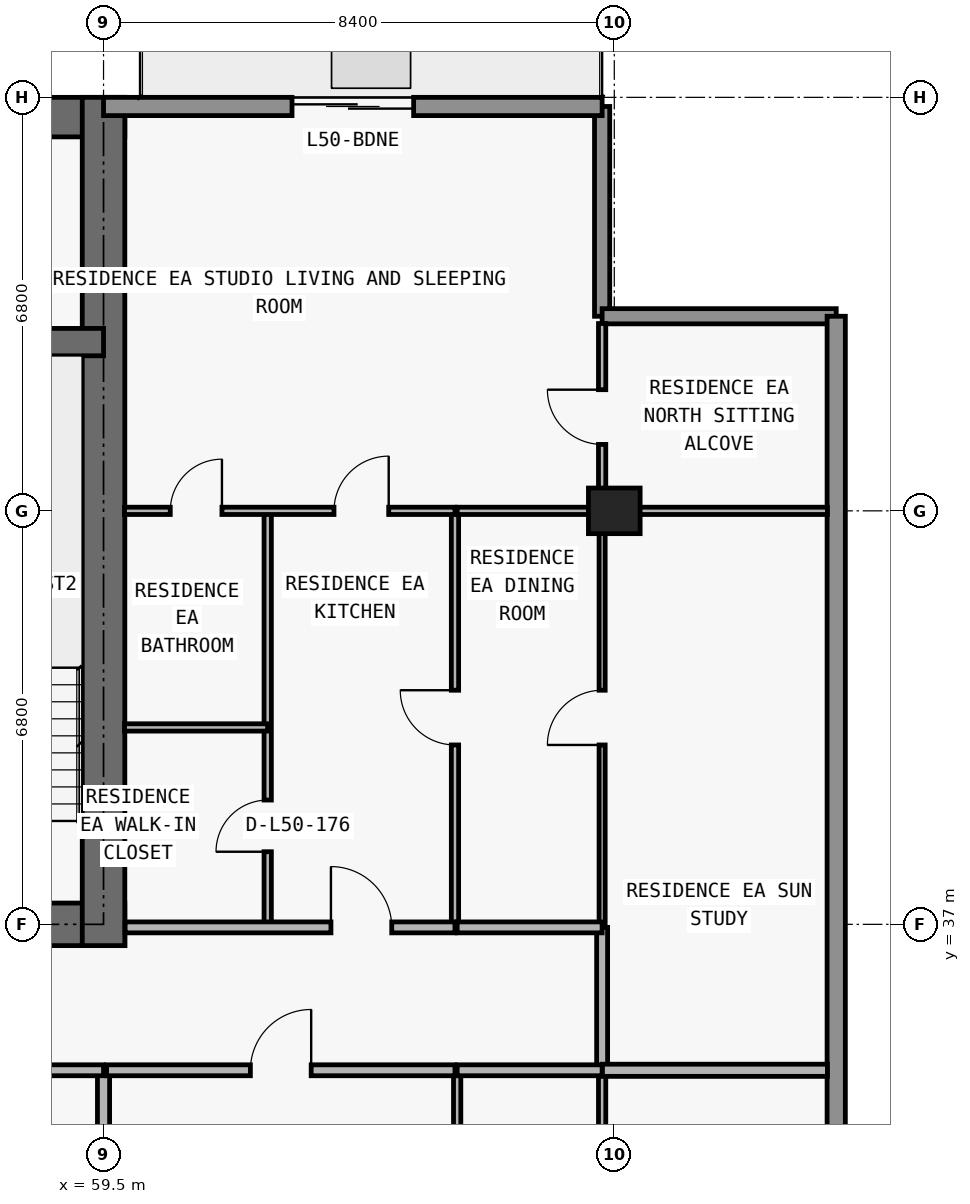
"""IFC4 building model, lengths in metres.
Left out: names, types, materials, properties, quantities, classifications, styles, units other than length and angle.
Written with IfcOpenShell. Run it as: python <this file> out.ifc"""

import sys

from ifc_helpers import new_model, si_unit, direction, frame, frame_2d, origin, origin_2d, place, context, subcontext, project, spatial, rectangle, extrude, element, fill, save


model = new_model("IFC4")
c1 = context("Model", 3, precision=1e-05, world=origin(), true_north=direction((0.0, 1.0)))
c2 = subcontext(c1, "Body", "Model", "MODEL_VIEW")
j1 = project(units=[si_unit("LENGTHUNIT", "METRE"), si_unit("PLANEANGLEUNIT", "RADIAN")], contexts=[c1])
p1 = place(None, origin())
s1 = spatial("IfcSite", under=j1, at=p1, CompositionType="ELEMENT")
p2 = place(p1, origin())
s2 = spatial("IfcBuilding", under=s1, at=p2, CompositionType="ELEMENT")
p3 = place(p2, frame((0.0, 0.0, 180.3)))
s3 = spatial("IfcBuildingStorey", under=s2, at=p3, CompositionType="ELEMENT", Elevation=180.3)
p4 = place(p3, frame((67.9, 43.8, 0.0), z_axis=(0.0, 0.0, 1.0), x_axis=(1.0, 0.0, 0.0)))
e1 = element("IfcColumn", 1, at=p4, inside=s3, PredefinedType="COLUMN", context=c2, shape_type="SweptSolid", body=[
    extrude(rectangle(XDim=0.85, YDim=0.75, at=origin_2d()), origin(), (0.0, 0.0, 1.0), 3.0),
])
p5 = place(p3, frame((17.95, 37.0, 0.0), z_axis=(0.0, 0.0, 1.0), x_axis=(1.0, 0.0, 0.0)))
e2 = element("IfcWall", 2, at=p5, inside=s3, PredefinedType="SHEAR", context=c2, shape_type="SweptSolid", body=[
    extrude(rectangle(XDim=41.9, YDim=0.7, at=frame_2d((20.95, 0.0))), origin(), (0.0, 0.0, 1.0), 3.0),
])
p6 = place(p5, frame((14.35, 0.0, 0.0)))
e3 = element("IfcOpeningElement", 3, at=p6, cuts=e2, PredefinedType="OPENING", context=c2, shape_type="SweptSolid", body=[
    extrude(rectangle(XDim=1.1, YDim=2.15, at=frame_2d((0.55, 1.075))), frame((0.0, 0.36, 0.0), z_axis=(0.0, -1.0, 0.0), x_axis=(1.0, 0.0, 0.0)), (0.0, 0.0, 1.0), 0.72),
])
p7 = place(p5, frame((6.2, 0.0, 0.0)))
e4 = element("IfcOpeningElement", 4, at=p7, cuts=e2, PredefinedType="OPENING", context=c2, shape_type="SweptSolid", body=[
    extrude(rectangle(XDim=1.05, YDim=2.15, at=frame_2d((0.525, 1.075))), frame((0.0, 0.36, 0.0), z_axis=(0.0, -1.0, 0.0), x_axis=(1.0, 0.0, 0.0)), (0.0, 0.0, 1.0), 0.72),
])
p8 = place(p5, frame((34.7, 0.0, 0.0)))
e5 = element("IfcOpeningElement", 5, at=p8, cuts=e2, PredefinedType="OPENING", context=c2, shape_type="SweptSolid", body=[
    extrude(rectangle(XDim=1.05, YDim=2.15, at=frame_2d((0.525, 1.075))), frame((0.0, 0.36, 0.0), z_axis=(0.0, -1.0, 0.0), x_axis=(1.0, 0.0, 0.0)), (0.0, 0.0, 1.0), 0.72),
])
p9 = place(p5, frame((10.812, 0.0, 0.0)))
e6 = element("IfcOpeningElement", 6, at=p9, cuts=e2, PredefinedType="OPENING", context=c2, shape_type="SweptSolid", body=[
    extrude(rectangle(XDim=1.05, YDim=2.15, at=frame_2d((0.525, 1.075))), frame((0.0, 0.36, 0.0), z_axis=(0.0, -1.0, 0.0), x_axis=(1.0, 0.0, 0.0)), (0.0, 0.0, 1.0), 0.72),
])
p10 = place(p5, frame((24.05, 0.0, 0.0)))
e7 = element("IfcOpeningElement", 7, at=p10, cuts=e2, PredefinedType="OPENING", context=c2, shape_type="SweptSolid", body=[
    extrude(rectangle(XDim=1.05, YDim=2.15, at=frame_2d((0.525, 1.075))), frame((0.0, 0.36, 0.0), z_axis=(0.0, -1.0, 0.0), x_axis=(1.0, 0.0, 0.0)), (0.0, 0.0, 1.0), 0.72),
])
p11 = place(p3, frame((17.95, 50.275, 0.0), z_axis=(0.0, 0.0, 1.0), x_axis=(1.0, 0.0, 0.0)))
e8 = element("IfcWall", 8, at=p11, inside=s3, PredefinedType="SHEAR", context=c2, shape_type="SweptSolid", body=[
    extrude(rectangle(XDim=41.9, YDim=0.65, at=frame_2d((20.95, 0.0))), origin(), (0.0, 0.0, 1.0), 3.0),
])
p12 = place(p3, frame((59.5, 36.65, 0.0), z_axis=(0.0, 0.0, 1.0), x_axis=(0.0, 1.0, 0.0)))
e9 = element("IfcWall", 9, at=p12, inside=s3, PredefinedType="SHEAR", context=c2, shape_type="SweptSolid", body=[
    extrude(rectangle(XDim=13.95, YDim=0.7, at=frame_2d((6.975, 0.0))), origin(), (0.0, 0.0, 1.0), 3.0),
])
p13 = place(p3, frame((18.3, 46.575, 0.0), z_axis=(0.0, 0.0, 1.0), x_axis=(1.0, 0.0, 0.0)))
e10 = element("IfcWall", 10, at=p13, inside=s3, PredefinedType="SHEAR", context=c2, shape_type="SweptSolid", body=[
    extrude(rectangle(XDim=41.2, YDim=0.45, at=frame_2d((20.6, 0.0))), origin(), (0.0, 0.0, 1.0), 3.0),
])
p14 = place(p13, frame((7.6, 0.0, 0.0)))
e11 = element("IfcOpeningElement", 11, at=p14, cuts=e10, PredefinedType="OPENING", context=c2, shape_type="SweptSolid", body=[
    extrude(rectangle(XDim=1.0, YDim=2.2, at=frame_2d((0.5, 1.1))), frame((0.0, 0.235, 0.0), z_axis=(0.0, -1.0, 0.0), x_axis=(1.0, 0.0, 0.0)), (0.0, 0.0, 1.0), 0.47),
])
p15 = place(p13, frame((32.625, 0.0, 0.0)))
e12 = element("IfcOpeningElement", 12, at=p15, cuts=e10, PredefinedType="OPENING", context=c2, shape_type="SweptSolid", body=[
    extrude(rectangle(XDim=1.05, YDim=2.15, at=frame_2d((0.525, 1.075))), frame((0.0, 0.235, 0.0), z_axis=(0.0, -1.0, 0.0), x_axis=(1.0, 0.0, 0.0)), (0.0, 0.0, 1.0), 0.47),
])
p16 = place(p3, frame((67.7, 50.45, 0.0), z_axis=(0.0, 0.0, 1.0), x_axis=(0.0, -1.0, 0.0)))
e13 = element("IfcWall", 13, at=p16, inside=s3, PredefinedType="ELEMENTEDWALL", context=c2, shape_type="SweptSolid", body=[
    extrude(rectangle(XDim=3.45, YDim=0.25, at=frame_2d((1.725, 0.0))), origin(), (0.0, 0.0, 1.0), 3.0),
])
p17 = place(p3, frame((67.7, 47.0, 0.0), z_axis=(0.0, 0.0, 1.0), x_axis=(1.0, 0.0, 0.0)))
e14 = element("IfcWall", 14, at=p17, inside=s3, PredefinedType="ELEMENTEDWALL", context=c2, shape_type="SweptSolid", body=[
    extrude(rectangle(XDim=3.85, YDim=0.25, at=frame_2d((1.925, 0.0))), origin(), (0.0, 0.0, 1.0), 3.0),
])
p18 = place(p3, frame((71.55, 47.0, 0.0), z_axis=(0.0, 0.0, 1.0), x_axis=(0.0, -1.0, 0.0)))
e15 = element("IfcWall", 15, at=p18, inside=s3, PredefinedType="STANDARD", context=c2, shape_type="SweptSolid", body=[
    extrude(rectangle(XDim=17.9, YDim=0.3, at=frame_2d((8.95, 0.0))), origin(), (0.0, 0.0, 1.0), 3.0),
])
p19 = place(p3, frame((59.5, 50.45, 0.0), z_axis=(0.0, 0.0, 1.0), x_axis=(1.0, 0.0, 0.0)))
e16 = element("IfcWall", 16, at=p19, inside=s3, PredefinedType="STANDARD", context=c2, shape_type="SweptSolid", body=[
    extrude(rectangle(XDim=8.2, YDim=0.3, at=frame_2d((4.1, 0.0))), origin(), (0.0, 0.0, 1.0), 3.0),
])
p20 = place(p19, frame((3.1, 0.0, 0.0)))
e17 = element("IfcOpeningElement", 17, at=p20, cuts=e16, PredefinedType="OPENING", context=c2, shape_type="SweptSolid", body=[
    extrude(rectangle(XDim=2.0, YDim=2.3, at=frame_2d((1.0, 1.15))), frame((0.0, 0.16, 0.0), z_axis=(0.0, -1.0, 0.0), x_axis=(1.0, 0.0, 0.0)), (0.0, 0.0, 1.0), 0.32),
])
p21 = place(p3, frame((59.5, 30.34, 0.0), z_axis=(0.0, 0.0, 1.0), x_axis=(0.0, 1.0, 0.0)))
e18 = element("IfcWall", 18, at=p21, inside=s3, PredefinedType="PARTITIONING", context=c2, shape_type="SweptSolid", body=[
    extrude(rectangle(XDim=4.26, YDim=0.2, at=frame_2d((2.13, 0.0))), origin(), (0.0, 0.0, 1.0), 2.213),
])
p22 = place(p3, frame((62.2, 37.0, 0.0), z_axis=(0.0, 0.0, 1.0), x_axis=(0.0, 1.0, 0.0)))
e19 = element("IfcWall", 19, at=p22, inside=s3, PredefinedType="PARTITIONING", context=c2, shape_type="SweptSolid", body=[
    extrude(rectangle(XDim=6.8, YDim=0.12, at=frame_2d((3.4, 0.0))), origin(), (0.0, 0.0, 1.0), 3.0),
])
p23 = place(p22, frame((1.194, 0.0, 0.0)))
e20 = element("IfcOpeningElement", 20, at=p23, cuts=e19, PredefinedType="OPENING", context=c2, shape_type="SweptSolid", body=[
    extrude(rectangle(XDim=0.85, YDim=2.1, at=frame_2d((0.425, 1.05))), frame((0.0, 0.07, 0.0), z_axis=(0.0, -1.0, 0.0), x_axis=(1.0, 0.0, 0.0)), (0.0, 0.0, 1.0), 0.14),
])
p24 = place(p3, frame((65.28, 37.0, 0.0), z_axis=(0.0, 0.0, 1.0), x_axis=(0.0, 1.0, 0.0)))
e21 = element("IfcWall", 21, at=p24, inside=s3, PredefinedType="PARTITIONING", context=c2, shape_type="SweptSolid", body=[
    extrude(rectangle(XDim=6.8, YDim=0.12, at=frame_2d((3.4, 0.0))), origin(), (0.0, 0.0, 1.0), 3.0),
])
p25 = place(p24, frame((2.95, 0.0, 0.0)))
e22 = element("IfcOpeningElement", 22, at=p25, cuts=e21, PredefinedType="OPENING", context=c2, shape_type="SweptSolid", body=[
    extrude(rectangle(XDim=0.9, YDim=2.15, at=frame_2d((0.45, 1.075))), frame((0.0, 0.07, 0.0), z_axis=(0.0, -1.0, 0.0), x_axis=(1.0, 0.0, 0.0)), (0.0, 0.0, 1.0), 0.14),
])
p26 = place(p3, frame((65.316, 30.34, 0.0), z_axis=(0.0, 0.0, 1.0), x_axis=(0.0, 1.0, 0.0)))
e23 = element("IfcWall", 23, at=p26, inside=s3, PredefinedType="PARTITIONING", context=c2, shape_type="SweptSolid", body=[
    extrude(rectangle(XDim=4.26, YDim=0.12, at=frame_2d((2.13, 0.0))), origin(), (0.0, 0.0, 1.0), 3.0),
])
p27 = place(p26, frame((1.705, 0.0, 0.0)))
e24 = element("IfcOpeningElement", 24, at=p27, cuts=e23, PredefinedType="OPENING", context=c2, shape_type="SweptSolid", body=[
    extrude(rectangle(XDim=0.85, YDim=2.1, at=frame_2d((0.425, 1.05))), frame((0.0, 0.07, 0.0), z_axis=(0.0, -1.0, 0.0), x_axis=(1.0, 0.0, 0.0)), (0.0, 0.0, 1.0), 0.14),
])
p28 = place(p3, frame((67.7, 30.34, 0.0), z_axis=(0.0, 0.0, 1.0), x_axis=(0.0, 1.0, 0.0)))
e25 = element("IfcWall", 25, at=p28, inside=s3, PredefinedType="PARTITIONING", context=c2, shape_type="SweptSolid", body=[
    extrude(rectangle(XDim=4.26, YDim=0.12, at=frame_2d((2.13, 0.0))), origin(), (0.0, 0.0, 1.0), 2.213),
])
p29 = place(p3, frame((67.7, 34.605, 0.0), z_axis=(0.0, 0.0, 1.0), x_axis=(0.0, 1.0, 0.0)))
e26 = element("IfcWall", 26, at=p29, inside=s3, PredefinedType="PARTITIONING", context=c2, shape_type="SweptSolid", body=[
    extrude(rectangle(XDim=2.345, YDim=0.18, at=frame_2d((1.172, 0.0))), origin(), (0.0, 0.0, 1.0), 2.213),
])
p30 = place(p3, frame((67.7, 37.0, 0.0), z_axis=(0.0, 0.0, 1.0), x_axis=(0.0, 1.0, 0.0)))
e27 = element("IfcWall", 27, at=p30, inside=s3, PredefinedType="MOVABLE", context=c2, shape_type="SweptSolid", body=[
    extrude(rectangle(XDim=6.8, YDim=0.1, at=frame_2d((3.4, 0.0))), origin(), (0.0, 0.0, 1.0), 2.213),
])
p31 = place(p30, frame((2.95, 0.0, 0.0)))
e28 = element("IfcOpeningElement", 28, at=p31, cuts=e27, PredefinedType="OPENING", context=c2, shape_type="SweptSolid", body=[
    extrude(rectangle(XDim=0.9, YDim=2.15, at=frame_2d((0.45, 1.075))), frame((0.0, 0.06, 0.0), z_axis=(0.0, -1.0, 0.0), x_axis=(1.0, 0.0, 0.0)), (0.0, 0.0, 1.0), 0.12),
])
p32 = place(p3, frame((67.7, 43.805, 0.0), z_axis=(0.0, 0.0, 1.0), x_axis=(0.0, 1.0, 0.0)))
e29 = element("IfcWall", 29, at=p32, inside=s3, PredefinedType="PARTITIONING", context=c2, shape_type="SweptSolid", body=[
    extrude(rectangle(XDim=3.075, YDim=0.12, at=frame_2d((1.538, 0.0))), origin(), (0.0, 0.0, 1.0), 3.0),
])
p33 = place(p32, frame((1.087, 0.0, 0.0)))
e30 = element("IfcOpeningElement", 30, at=p33, cuts=e29, PredefinedType="OPENING", context=c2, shape_type="SweptSolid", body=[
    extrude(rectangle(XDim=0.9, YDim=2.15, at=frame_2d((0.45, 1.075))), frame((0.0, 0.07, 0.0), z_axis=(0.0, -1.0, 0.0), x_axis=(1.0, 0.0, 0.0)), (0.0, 0.0, 1.0), 0.14),
])
p34 = place(p3, frame((18.3, 34.6, 0.0), z_axis=(0.0, 0.0, 1.0), x_axis=(1.0, 0.0, 0.0)))
e31 = element("IfcWall", 31, at=p34, inside=s3, PredefinedType="PARTITIONING", context=c2, shape_type="SweptSolid", body=[
    extrude(rectangle(XDim=41.2, YDim=0.18, at=frame_2d((20.6, 0.0))), origin(), (0.0, 0.0, 1.0), 3.0),
])
p35 = place(p34, frame((2.67, 0.0, 0.0)))
e32 = element("IfcOpeningElement", 32, at=p35, cuts=e31, PredefinedType="OPENING", context=c2, shape_type="SweptSolid", body=[
    extrude(rectangle(XDim=1.0, YDim=2.2, at=frame_2d((0.5, 1.1))), frame((0.0, 0.1, 0.0), z_axis=(0.0, -1.0, 0.0), x_axis=(1.0, 0.0, 0.0)), (0.0, 0.0, 1.0), 0.2),
])
p36 = place(p34, frame((11.212, 0.0, 0.0)))
e33 = element("IfcOpeningElement", 33, at=p36, cuts=e31, PredefinedType="OPENING", context=c2, shape_type="SweptSolid", body=[
    extrude(rectangle(XDim=1.0, YDim=2.2, at=frame_2d((0.5, 1.1))), frame((0.0, 0.1, 0.0), z_axis=(0.0, -1.0, 0.0), x_axis=(1.0, 0.0, 0.0)), (0.0, 0.0, 1.0), 0.2),
])
p37 = place(p34, frame((35.483, 0.0, 0.0)))
e34 = element("IfcOpeningElement", 34, at=p37, cuts=e31, PredefinedType="OPENING", context=c2, shape_type="SweptSolid", body=[
    extrude(rectangle(XDim=1.0, YDim=2.2, at=frame_2d((0.5, 1.1))), frame((0.0, 0.1, 0.0), z_axis=(0.0, -1.0, 0.0), x_axis=(1.0, 0.0, 0.0)), (0.0, 0.0, 1.0), 0.2),
])
p38 = place(p3, frame((59.55, 34.6, 0.0), z_axis=(0.0, 0.0, 1.0), x_axis=(1.0, 0.0, 0.0)))
e35 = element("IfcWall", 35, at=p38, inside=s3, PredefinedType="PARTITIONING", context=c2, shape_type="SweptSolid", body=[
    extrude(rectangle(XDim=5.73, YDim=0.18, at=frame_2d((2.865, 0.0))), origin(), (0.0, 0.0, 1.0), 3.0),
])
p39 = place(p38, frame((2.365, 0.0, 0.0)))
e36 = element("IfcOpeningElement", 36, at=p39, cuts=e35, PredefinedType="OPENING", context=c2, shape_type="SweptSolid", body=[
    extrude(rectangle(XDim=1.0, YDim=2.2, at=frame_2d((0.5, 1.1))), frame((0.0, 0.1, 0.0), z_axis=(0.0, -1.0, 0.0), x_axis=(1.0, 0.0, 0.0)), (0.0, 0.0, 1.0), 0.2),
])
p40 = place(p3, frame((65.316, 34.6, 0.0), z_axis=(0.0, 0.0, 1.0), x_axis=(1.0, 0.0, 0.0)))
e37 = element("IfcWall", 37, at=p40, inside=s3, PredefinedType="PARTITIONING", context=c2, shape_type="SweptSolid", body=[
    extrude(rectangle(XDim=2.384, YDim=0.18, at=frame_2d((1.192, 0.0))), origin(), (0.0, 0.0, 1.0), 3.0),
])
p41 = place(p3, frame((67.705, 34.6, 0.0), z_axis=(0.0, 0.0, 1.0), x_axis=(1.0, 0.0, 0.0)))
e38 = element("IfcWall", 38, at=p41, inside=s3, PredefinedType="PARTITIONING", context=c2, shape_type="SweptSolid", body=[
    extrude(rectangle(XDim=3.7, YDim=0.2, at=frame_2d((1.85, 0.0))), origin(), (0.0, 0.0, 1.0), 3.0),
])
p42 = place(p3, frame((59.855, 36.95, 0.0), z_axis=(0.0, 0.0, 1.0), x_axis=(1.0, 0.0, 0.0)))
e39 = element("IfcWall", 39, at=p42, inside=s3, PredefinedType="PARTITIONING", context=c2, shape_type="SweptSolid", body=[
    extrude(rectangle(XDim=5.425, YDim=0.18, at=frame_2d((2.712, 0.0))), origin(), (0.0, 0.0, 1.0), 3.0),
])
p43 = place(p42, frame((3.385, 0.0, 0.0)))
e40 = element("IfcOpeningElement", 40, at=p43, cuts=e39, PredefinedType="OPENING", context=c2, shape_type="SweptSolid", body=[
    extrude(rectangle(XDim=1.0, YDim=2.2, at=frame_2d((0.5, 1.1))), frame((0.0, 0.1, 0.0), z_axis=(0.0, -1.0, 0.0), x_axis=(1.0, 0.0, 0.0)), (0.0, 0.0, 1.0), 0.2),
])
p44 = place(p3, frame((65.316, 36.95, 0.0), z_axis=(0.0, 0.0, 1.0), x_axis=(1.0, 0.0, 0.0)))
e41 = element("IfcWall", 41, at=p44, inside=s3, PredefinedType="PARTITIONING", context=c2, shape_type="SweptSolid", body=[
    extrude(rectangle(XDim=2.384, YDim=0.18, at=frame_2d((1.192, 0.0))), origin(), (0.0, 0.0, 1.0), 3.0),
])
p45 = place(p3, frame((59.845, 40.238, 0.0), z_axis=(0.0, 0.0, 1.0), x_axis=(1.0, 0.0, 0.0)))
e42 = element("IfcWall", 42, at=p45, inside=s3, PredefinedType="PARTITIONING", context=c2, shape_type="SweptSolid", body=[
    extrude(rectangle(XDim=2.355, YDim=0.12, at=frame_2d((1.177, 0.0))), origin(), (0.0, 0.0, 1.0), 3.0),
])
p46 = place(p3, frame((59.845, 43.8, 0.0), z_axis=(0.0, 0.0, 1.0), x_axis=(1.0, 0.0, 0.0)))
e43 = element("IfcWall", 43, at=p46, inside=s3, PredefinedType="PARTITIONING", context=c2, shape_type="SweptSolid", body=[
    extrude(rectangle(XDim=5.435, YDim=0.12, at=frame_2d((2.718, 0.0))), origin(), (0.0, 0.0, 1.0), 2.368),
])
p47 = place(p46, frame((3.445, 0.0, 0.0)))
e44 = element("IfcOpeningElement", 44, at=p47, cuts=e43, PredefinedType="OPENING", context=c2, shape_type="SweptSolid", body=[
    extrude(rectangle(XDim=0.9, YDim=2.15, at=frame_2d((0.45, 1.075))), frame((0.0, 0.07, 0.0), z_axis=(0.0, -1.0, 0.0), x_axis=(1.0, 0.0, 0.0)), (0.0, 0.0, 1.0), 0.14),
])
p48 = place(p46, frame((0.752, 0.0, 0.0)))
e45 = element("IfcOpeningElement", 45, at=p48, cuts=e43, PredefinedType="OPENING", context=c2, shape_type="SweptSolid", body=[
    extrude(rectangle(XDim=0.85, YDim=2.1, at=frame_2d((0.425, 1.05))), frame((0.0, 0.07, 0.0), z_axis=(0.0, -1.0, 0.0), x_axis=(1.0, 0.0, 0.0)), (0.0, 0.0, 1.0), 0.14),
])
p49 = place(p3, frame((65.316, 43.8, 0.0), z_axis=(0.0, 0.0, 1.0), x_axis=(1.0, 0.0, 0.0)))
e46 = element("IfcWall", 46, at=p49, inside=s3, PredefinedType="PARTITIONING", context=c2, shape_type="SweptSolid", body=[
    extrude(rectangle(XDim=6.089, YDim=0.12, at=frame_2d((3.044, 0.0))), origin(), (0.0, 0.0, 1.0), 2.368),
])
p50 = place(p20, origin())
e47 = element("IfcDoor", 47, at=p50, inside=s3, OperationType="DOUBLE_DOOR_SLIDING", PredefinedType="DOOR", context=c2, shape_type="SweptSolid", body=[
    extrude(rectangle(XDim=2.0, YDim=2.3, at=frame_2d((1.0, 1.15))), frame((0.0, 0.025, 0.0), z_axis=(0.0, -1.0, 0.0), x_axis=(1.0, 0.0, 0.0)), (0.0, 0.0, 1.0), 0.05),
])
fill(e17, e47)
p51 = place(p39, origin())
e48 = element("IfcDoor", 48, at=p51, inside=s3, OperationType="SINGLE_SWING_RIGHT", PredefinedType="DOOR", context=c2, shape_type="SweptSolid", body=[
    extrude(rectangle(XDim=1.0, YDim=2.2, at=frame_2d((0.5, 1.1))), frame((0.0, 0.025, 0.0), z_axis=(0.0, -1.0, 0.0), x_axis=(1.0, 0.0, 0.0)), (0.0, 0.0, 1.0), 0.05),
])
fill(e36, e48)
p52 = place(p25, origin())
e49 = element("IfcDoor", 49, at=p52, inside=s3, OperationType="SINGLE_SWING_RIGHT", PredefinedType="DOOR", context=c2, shape_type="SweptSolid", body=[
    extrude(rectangle(XDim=0.9, YDim=2.15, at=frame_2d((0.45, 1.075))), frame((0.0, 0.025, 0.0), z_axis=(0.0, -1.0, 0.0), x_axis=(1.0, 0.0, 0.0)), (0.0, 0.0, 1.0), 0.05),
])
fill(e22, e49)
p53 = place(p43, origin())
e50 = element("IfcDoor", 50, at=p53, inside=s3, OperationType="SINGLE_SWING_LEFT", PredefinedType="DOOR", context=c2, shape_type="SweptSolid", body=[
    extrude(rectangle(XDim=1.0, YDim=2.2, at=frame_2d((0.5, 1.1))), frame((0.0, 0.025, 0.0), z_axis=(0.0, -1.0, 0.0), x_axis=(1.0, 0.0, 0.0)), (0.0, 0.0, 1.0), 0.05),
])
fill(e40, e50)
p54 = place(p47, origin())
e51 = element("IfcDoor", 51, at=p54, inside=s3, OperationType="SINGLE_SWING_RIGHT", PredefinedType="DOOR", context=c2, shape_type="SweptSolid", body=[
    extrude(rectangle(XDim=0.9, YDim=2.15, at=frame_2d((0.45, 1.075))), frame((0.0, 0.025, 0.0), z_axis=(0.0, -1.0, 0.0), x_axis=(1.0, 0.0, 0.0)), (0.0, 0.0, 1.0), 0.05),
])
fill(e44, e51)
p55 = place(p23, origin())
e52 = element("IfcDoor", 52, at=p55, inside=s3, OperationType="SINGLE_SWING_LEFT", PredefinedType="DOOR", context=c2, shape_type="SweptSolid", body=[
    extrude(rectangle(XDim=0.85, YDim=2.1, at=frame_2d((0.425, 1.05))), frame((0.0, 0.025, 0.0), z_axis=(0.0, -1.0, 0.0), x_axis=(1.0, 0.0, 0.0)), (0.0, 0.0, 1.0), 0.05),
])
fill(e20, e52)
p56 = place(p48, origin())
e53 = element("IfcDoor", 53, at=p56, inside=s3, OperationType="SINGLE_SWING_RIGHT", PredefinedType="DOOR", context=c2, shape_type="SweptSolid", body=[
    extrude(rectangle(XDim=0.85, YDim=2.1, at=frame_2d((0.425, 1.05))), frame((0.0, 0.025, 0.0), z_axis=(0.0, -1.0, 0.0), x_axis=(1.0, 0.0, 0.0)), (0.0, 0.0, 1.0), 0.05),
])
fill(e45, e53)
p57 = place(p31, origin())
e54 = element("IfcDoor", 54, at=p57, inside=s3, OperationType="SINGLE_SWING_LEFT", PredefinedType="DOOR", context=c2, shape_type="SweptSolid", body=[
    extrude(rectangle(XDim=0.9, YDim=2.15, at=frame_2d((0.45, 1.075))), frame((0.0, 0.025, 0.0), z_axis=(0.0, -1.0, 0.0), x_axis=(1.0, 0.0, 0.0)), (0.0, 0.0, 1.0), 0.05),
])
fill(e28, e54)
p58 = place(p33, origin())
e55 = element("IfcDoor", 55, at=p58, inside=s3, OperationType="SINGLE_SWING_RIGHT", PredefinedType="DOOR", context=c2, shape_type="SweptSolid", body=[
    extrude(rectangle(XDim=0.9, YDim=2.15, at=frame_2d((0.45, 1.075))), frame((0.0, 0.025, 0.0), z_axis=(0.0, -1.0, 0.0), x_axis=(1.0, 0.0, 0.0)), (0.0, 0.0, 1.0), 0.05),
])
fill(e30, e55)
save(model, sys.argv[1])
